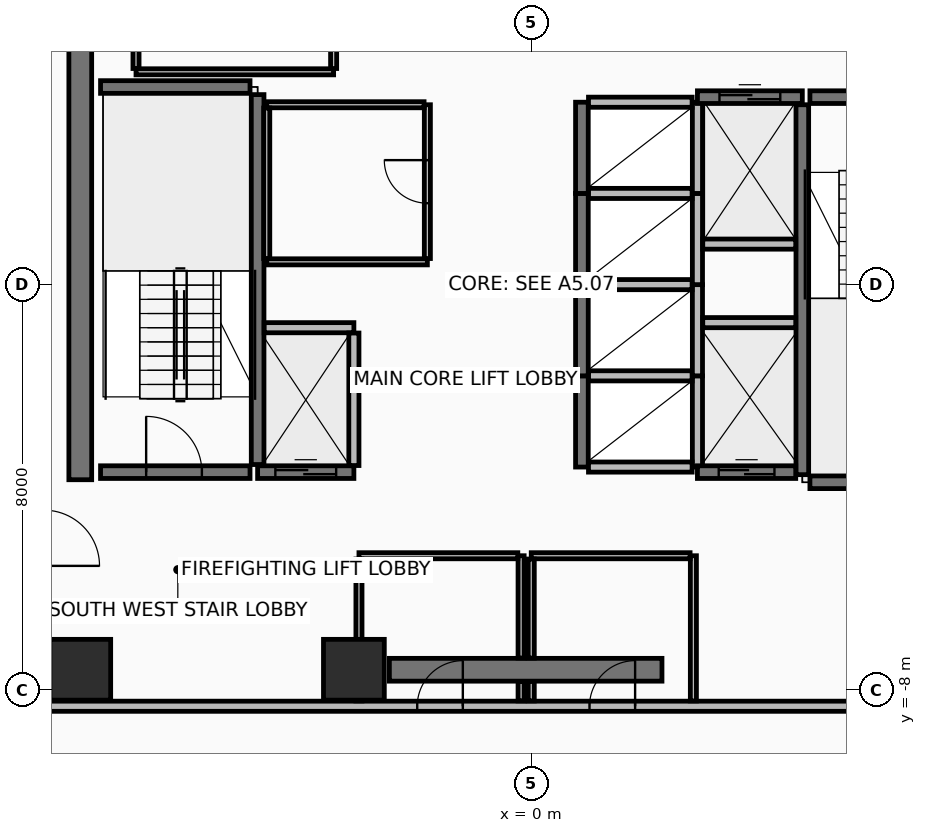
"""IFC4 building model, lengths in metres.
Left out: names, types, materials, properties, quantities, classifications, styles, units other than length and angle.
Written with IfcOpenShell. Run it as: python <this file> out.ifc"""

import sys

from ifc_helpers import new_model, si_unit, direction, frame, frame_2d, origin, origin_2d, place, context, subcontext, project, spatial, rectangle, extrude, element, fill, save


model = new_model("IFC4")
c1 = context("Model", 3, precision=1e-05, world=origin(), true_north=direction((0.0, 1.0)))
c2 = subcontext(c1, "Body", "Model", "MODEL_VIEW")
j1 = project(units=[si_unit("LENGTHUNIT", "METRE"), si_unit("PLANEANGLEUNIT", "RADIAN")], contexts=[c1])
p1 = place(None, origin())
s1 = spatial("IfcSite", under=j1, at=p1, CompositionType="ELEMENT")
p2 = place(p1, origin())
s2 = spatial("IfcBuilding", under=s1, at=p2, CompositionType="ELEMENT")
p3 = place(p2, frame((0.0, 0.0, 119.65)))
s3 = spatial("IfcBuildingStorey", under=s2, at=p3, CompositionType="ELEMENT", Elevation=119.65)
for number, where, z_axis, x_axis in (
    (1, (-8.9, -7.6, 0.0), (0.0, 0.0, 1.0), (1.0, 0.0, 0.0)),
    (2, (-3.5, -7.6, 0.0), (0.0, 0.0, 1.0), (1.0, 0.0, 0.0)),
):
    element("IfcColumn", number, at=place(p3, frame(where, z_axis=z_axis, x_axis=x_axis)), inside=s3, PredefinedType="COLUMN", context=c2, shape_type="SweptSolid", body=[
        extrude(rectangle(XDim=1.2, YDim=1.2, at=origin_2d()), origin(), (0.0, 0.0, 1.0), 3.6),
    ])
p4 = place(p3, frame((-2.8, -7.6, 0.0), z_axis=(0.0, 0.0, 1.0), x_axis=(1.0, 0.0, 0.0)))
e3 = element("IfcWall", 3, at=p4, inside=s3, PredefinedType="SHEAR", context=c2, shape_type="SweptSolid", body=[
    extrude(rectangle(XDim=5.38, YDim=0.45, at=frame_2d((2.69, 0.0))), origin(), (0.0, 0.0, 1.0), 3.41),
])
p5 = place(p3, frame((-8.9, -3.85, 0.0), z_axis=(0.0, 0.0, 1.0), x_axis=(0.0, 1.0, 0.0)))
e4 = element("IfcWall", 4, at=p5, inside=s3, PredefinedType="SHEAR", context=c2, shape_type="SweptSolid", body=[
    extrude(rectangle(XDim=10.7, YDim=0.45, at=frame_2d((5.35, 0.0))), origin(), (0.0, 0.0, 1.0), 3.41),
])
p6 = place(p3, frame((-9.62, -8.32, 0.0), z_axis=(0.0, 0.0, 1.0), x_axis=(1.0, 0.0, 0.0)))
e5 = element("IfcWall", 5, at=p6, inside=s3, PredefinedType="PARTITIONING", context=c2, shape_type="SweptSolid", body=[
    extrude(rectangle(XDim=19.24, YDim=0.2, at=frame_2d((9.62, 0.0))), origin(), (0.0, 0.0, 1.0), 2.855),
])
p7 = place(p6, frame((7.37, 0.0, 0.0)))
e6 = element("IfcOpeningElement", 6, at=p7, cuts=e5, PredefinedType="OPENING", context=c2, shape_type="SweptSolid", body=[
    extrude(rectangle(XDim=0.9, YDim=2.1, at=frame_2d((0.45, 1.05))), frame((0.0, 0.11, 0.0), z_axis=(0.0, -1.0, 0.0), x_axis=(1.0, 0.0, 0.0)), (0.0, 0.0, 1.0), 0.22),
])
p8 = place(p6, frame((10.77, 0.0, 0.0)))
e7 = element("IfcOpeningElement", 7, at=p8, cuts=e5, PredefinedType="OPENING", context=c2, shape_type="SweptSolid", body=[
    extrude(rectangle(XDim=0.9, YDim=2.1, at=frame_2d((0.45, 1.05))), frame((0.0, 0.11, 0.0), z_axis=(0.0, -1.0, 0.0), x_axis=(1.0, 0.0, 0.0)), (0.0, 0.0, 1.0), 0.22),
])
p9 = place(p3, frame((-5.4, -3.55, 0.0), z_axis=(0.0, 0.0, 1.0), x_axis=(0.0, 1.0, 0.0)))
e8 = element("IfcWall", 8, at=p9, inside=s3, PredefinedType="SHEAR", context=c2, shape_type="SweptSolid", body=[
    extrude(rectangle(XDim=7.3, YDim=0.25, at=frame_2d((3.65, 0.0))), origin(), (0.0, 0.0, 1.0), 3.41),
])
p10 = place(p3, frame((-8.5, -3.7, 0.0), z_axis=(0.0, 0.0, 1.0), x_axis=(1.0, 0.0, 0.0)))
e9 = element("IfcWall", 9, at=p10, inside=s3, PredefinedType="SHEAR", context=c2, shape_type="SweptSolid", body=[
    extrude(rectangle(XDim=2.95, YDim=0.25, at=frame_2d((1.475, 0.0))), origin(), (0.0, 0.0, 1.0), 3.41),
])
p11 = place(p10, frame((0.9, 0.0, 0.0)))
e10 = element("IfcOpeningElement", 10, at=p11, cuts=e9, PredefinedType="OPENING", context=c2, shape_type="SweptSolid", body=[
    extrude(rectangle(XDim=1.1, YDim=2.15, at=frame_2d((0.55, 1.075))), frame((0.0, 0.135, 0.0), z_axis=(0.0, -1.0, 0.0), x_axis=(1.0, 0.0, 0.0)), (0.0, 0.0, 1.0), 0.27),
])
p12 = place(p3, frame((-8.5, 3.9, 0.0), z_axis=(0.0, 0.0, 1.0), x_axis=(1.0, 0.0, 0.0)))
e11 = element("IfcWall", 11, at=p12, inside=s3, PredefinedType="SHEAR", context=c2, shape_type="SweptSolid", body=[
    extrude(rectangle(XDim=2.95, YDim=0.25, at=frame_2d((1.475, 0.0))), origin(), (0.0, 0.0, 1.0), 3.41),
])
p13 = place(p3, frame((5.35, -3.75, 0.0), z_axis=(0.0, 0.0, 1.0), x_axis=(0.0, 1.0, 0.0)))
e12 = element("IfcWall", 12, at=p13, inside=s3, PredefinedType="SHEAR", context=c2, shape_type="SweptSolid", body=[
    extrude(rectangle(XDim=7.3, YDim=0.25, at=frame_2d((3.65, 0.0))), origin(), (0.0, 0.0, 1.0), 3.41),
])
p14 = place(p3, frame((5.5, 3.7, 0.0), z_axis=(0.0, 0.0, 1.0), x_axis=(1.0, 0.0, 0.0)))
e13 = element("IfcWall", 13, at=p14, inside=s3, PredefinedType="SHEAR", context=c2, shape_type="SweptSolid", body=[
    extrude(rectangle(XDim=3.0, YDim=0.25, at=frame_2d((1.5, 0.0))), origin(), (0.0, 0.0, 1.0), 3.41),
])
p15 = place(p14, frame((0.95, 0.0, 0.0)))
e14 = element("IfcOpeningElement", 14, at=p15, cuts=e13, PredefinedType="OPENING", context=c2, shape_type="SweptSolid", body=[
    extrude(rectangle(XDim=1.1, YDim=2.15, at=frame_2d((0.55, 1.075))), frame((0.0, 0.135, 0.0), z_axis=(0.0, -1.0, 0.0), x_axis=(1.0, 0.0, 0.0)), (0.0, 0.0, 1.0), 0.27),
])
p16 = place(p3, frame((5.5, -3.9, 0.0), z_axis=(0.0, 0.0, 1.0), x_axis=(1.0, 0.0, 0.0)))
e15 = element("IfcWall", 15, at=p16, inside=s3, PredefinedType="SHEAR", context=c2, shape_type="SweptSolid", body=[
    extrude(rectangle(XDim=3.0, YDim=0.25, at=frame_2d((1.5, 0.0))), origin(), (0.0, 0.0, 1.0), 3.41),
])
p17 = place(p3, frame((1.0, -3.6, 0.0), z_axis=(0.0, 0.0, 1.0), x_axis=(0.0, 1.0, 0.0)))
e16 = element("IfcWall", 16, at=p17, inside=s3, PredefinedType="SHEAR", context=c2, shape_type="SweptSolid", body=[
    extrude(rectangle(XDim=1.8, YDim=0.25, at=frame_2d((0.9, 0.0))), origin(), (0.0, 0.0, 1.0), 3.41),
])
p18 = place(p3, frame((3.28, -3.6, 0.0), z_axis=(0.0, 0.0, 1.0), x_axis=(0.0, 1.0, 0.0)))
e17 = element("IfcWall", 17, at=p18, inside=s3, PredefinedType="PARTITIONING", context=c2, shape_type="SweptSolid", body=[
    extrude(rectangle(XDim=1.8, YDim=0.2, at=frame_2d((0.9, 0.0))), origin(), (0.0, 0.0, 1.0), 3.41),
])
for number, where, z_axis, x_axis in (
    (18, (1.13, -3.6, 0.0), (0.0, 0.0, 1.0), (1.0, 0.0, 0.0)),
    (19, (1.13, -1.8, 0.0), (0.0, 0.0, 1.0), (1.0, 0.0, 0.0)),
):
    element("IfcWall", number, at=place(p3, frame(where, z_axis=z_axis, x_axis=x_axis)), inside=s3, PredefinedType="PARTITIONING", context=c2, shape_type="SweptSolid", body=[
        extrude(rectangle(XDim=2.045, YDim=0.2, at=frame_2d((1.022, 0.0))), origin(), (0.0, 0.0, 1.0), 3.41),
    ])
p19 = place(p3, frame((1.0, -1.8, 0.0), z_axis=(0.0, 0.0, 1.0), x_axis=(0.0, 1.0, 0.0)))
e20 = element("IfcWall", 20, at=p19, inside=s3, PredefinedType="SHEAR", context=c2, shape_type="SweptSolid", body=[
    extrude(rectangle(XDim=1.8, YDim=0.25, at=frame_2d((0.9, 0.0))), origin(), (0.0, 0.0, 1.0), 3.41),
])
p20 = place(p3, frame((3.28, -1.8, 0.0), z_axis=(0.0, 0.0, 1.0), x_axis=(0.0, 1.0, 0.0)))
e21 = element("IfcWall", 21, at=p20, inside=s3, PredefinedType="PARTITIONING", context=c2, shape_type="SweptSolid", body=[
    extrude(rectangle(XDim=1.8, YDim=0.2, at=frame_2d((0.9, 0.0))), origin(), (0.0, 0.0, 1.0), 3.41),
])
p21 = place(p3, frame((1.13, 0.0, 0.0), z_axis=(0.0, 0.0, 1.0), x_axis=(1.0, 0.0, 0.0)))
e22 = element("IfcWall", 22, at=p21, inside=s3, PredefinedType="PARTITIONING", context=c2, shape_type="SweptSolid", body=[
    extrude(rectangle(XDim=2.045, YDim=0.2, at=frame_2d((1.022, 0.0))), origin(), (0.0, 0.0, 1.0), 3.41),
])
p22 = place(p3, frame((1.0, 0.0, 0.0), z_axis=(0.0, 0.0, 1.0), x_axis=(0.0, 1.0, 0.0)))
e23 = element("IfcWall", 23, at=p22, inside=s3, PredefinedType="SHEAR", context=c2, shape_type="SweptSolid", body=[
    extrude(rectangle(XDim=1.8, YDim=0.25, at=frame_2d((0.9, 0.0))), origin(), (0.0, 0.0, 1.0), 3.41),
])
p23 = place(p3, frame((3.28, 0.0, 0.0), z_axis=(0.0, 0.0, 1.0), x_axis=(0.0, 1.0, 0.0)))
e24 = element("IfcWall", 24, at=p23, inside=s3, PredefinedType="PARTITIONING", context=c2, shape_type="SweptSolid", body=[
    extrude(rectangle(XDim=1.8, YDim=0.2, at=frame_2d((0.9, 0.0))), origin(), (0.0, 0.0, 1.0), 3.41),
])
p24 = place(p3, frame((1.13, 1.8, 0.0), z_axis=(0.0, 0.0, 1.0), x_axis=(1.0, 0.0, 0.0)))
e25 = element("IfcWall", 25, at=p24, inside=s3, PredefinedType="PARTITIONING", context=c2, shape_type="SweptSolid", body=[
    extrude(rectangle(XDim=2.045, YDim=0.2, at=frame_2d((1.022, 0.0))), origin(), (0.0, 0.0, 1.0), 3.41),
])
p25 = place(p3, frame((1.0, 1.8, 0.0), z_axis=(0.0, 0.0, 1.0), x_axis=(0.0, 1.0, 0.0)))
e26 = element("IfcWall", 26, at=p25, inside=s3, PredefinedType="SHEAR", context=c2, shape_type="SweptSolid", body=[
    extrude(rectangle(XDim=1.8, YDim=0.25, at=frame_2d((0.9, 0.0))), origin(), (0.0, 0.0, 1.0), 3.41),
])
p26 = place(p3, frame((3.28, 1.8, 0.0), z_axis=(0.0, 0.0, 1.0), x_axis=(0.0, 1.0, 0.0)))
e27 = element("IfcWall", 27, at=p26, inside=s3, PredefinedType="PARTITIONING", context=c2, shape_type="SweptSolid", body=[
    extrude(rectangle(XDim=1.8, YDim=0.2, at=frame_2d((0.9, 0.0))), origin(), (0.0, 0.0, 1.0), 3.41),
])
p27 = place(p3, frame((1.13, 3.6, 0.0), z_axis=(0.0, 0.0, 1.0), x_axis=(1.0, 0.0, 0.0)))
e28 = element("IfcWall", 28, at=p27, inside=s3, PredefinedType="PARTITIONING", context=c2, shape_type="SweptSolid", body=[
    extrude(rectangle(XDim=2.045, YDim=0.2, at=frame_2d((1.022, 0.0))), origin(), (0.0, 0.0, 1.0), 2.605),
])
p28 = place(p3, frame((-5.4, -3.7, 0.0), z_axis=(0.0, 0.0, 1.0), x_axis=(1.0, 0.0, 0.0)))
e29 = element("IfcWall", 29, at=p28, inside=s3, PredefinedType="SHEAR", context=c2, shape_type="SweptSolid", body=[
    extrude(rectangle(XDim=1.9, YDim=0.25, at=frame_2d((0.95, 0.0))), origin(), (0.0, 0.0, 1.0), 3.41),
])
p29 = place(p28, frame((0.35, 0.0, 0.0)))
e30 = element("IfcOpeningElement", 30, at=p29, cuts=e29, PredefinedType="OPENING", context=c2, shape_type="SweptSolid", body=[
    extrude(rectangle(XDim=1.2, YDim=2.2, at=frame_2d((0.6, 1.1))), frame((0.0, 0.135, 0.0), z_axis=(0.0, -1.0, 0.0), x_axis=(1.0, 0.0, 0.0)), (0.0, 0.0, 1.0), 0.27),
])
p30 = place(p3, frame((-5.27, -0.85, 0.0), z_axis=(0.0, 0.0, 1.0), x_axis=(1.0, 0.0, 0.0)))
e31 = element("IfcWall", 31, at=p30, inside=s3, PredefinedType="PARTITIONING", context=c2, shape_type="SweptSolid", body=[
    extrude(rectangle(XDim=1.77, YDim=0.2, at=frame_2d((0.885, 0.0))), origin(), (0.0, 0.0, 1.0), 3.41),
])
p31 = place(p3, frame((-3.5, -3.57, 0.0), z_axis=(0.0, 0.0, 1.0), x_axis=(0.0, 1.0, 0.0)))
e32 = element("IfcWall", 32, at=p31, inside=s3, PredefinedType="PARTITIONING", context=c2, shape_type="SweptSolid", body=[
    extrude(rectangle(XDim=2.615, YDim=0.2, at=frame_2d((1.308, 0.0))), origin(), (0.0, 0.0, 1.0), 3.41),
])
p32 = place(p3, frame((3.28, 3.7, 0.0), z_axis=(0.0, 0.0, 1.0), x_axis=(1.0, 0.0, 0.0)))
e33 = element("IfcWall", 33, at=p32, inside=s3, PredefinedType="SHEAR", context=c2, shape_type="SweptSolid", body=[
    extrude(rectangle(XDim=2.07, YDim=0.25, at=frame_2d((1.035, 0.0))), origin(), (0.0, 0.0, 1.0), 3.41),
])
p33 = place(p32, frame((0.435, 0.0, 0.0)))
e34 = element("IfcOpeningElement", 34, at=p33, cuts=e33, PredefinedType="OPENING", context=c2, shape_type="SweptSolid", body=[
    extrude(rectangle(XDim=1.2, YDim=2.2, at=frame_2d((0.6, 1.1))), frame((0.0, 0.135, 0.0), z_axis=(0.0, -1.0, 0.0), x_axis=(1.0, 0.0, 0.0)), (0.0, 0.0, 1.0), 0.27),
])
p34 = place(p3, frame((3.385, 0.8, 0.0), z_axis=(0.0, 0.0, 1.0), x_axis=(1.0, 0.0, 0.0)))
e35 = element("IfcWall", 35, at=p34, inside=s3, PredefinedType="PARTITIONING", context=c2, shape_type="SweptSolid", body=[
    extrude(rectangle(XDim=1.835, YDim=0.2, at=frame_2d((0.917, 0.0))), origin(), (0.0, 0.0, 1.0), 3.41),
])
p35 = place(p3, frame((3.28, -3.7, 0.0), z_axis=(0.0, 0.0, 1.0), x_axis=(1.0, 0.0, 0.0)))
e36 = element("IfcWall", 36, at=p35, inside=s3, PredefinedType="SHEAR", context=c2, shape_type="SweptSolid", body=[
    extrude(rectangle(XDim=1.94, YDim=0.25, at=frame_2d((0.97, 0.0))), origin(), (0.0, 0.0, 1.0), 3.41),
])
p36 = place(p35, frame((0.42, 0.0, 0.0)))
e37 = element("IfcOpeningElement", 37, at=p36, cuts=e36, PredefinedType="OPENING", context=c2, shape_type="SweptSolid", body=[
    extrude(rectangle(XDim=1.1, YDim=2.2, at=frame_2d((0.55, 1.1))), frame((0.0, 0.135, 0.0), z_axis=(0.0, -1.0, 0.0), x_axis=(1.0, 0.0, 0.0)), (0.0, 0.0, 1.0), 0.27),
])
p37 = place(p3, frame((3.385, -0.75, 0.0), z_axis=(0.0, 0.0, 1.0), x_axis=(1.0, 0.0, 0.0)))
e38 = element("IfcWall", 38, at=p37, inside=s3, PredefinedType="PARTITIONING", context=c2, shape_type="SweptSolid", body=[
    extrude(rectangle(XDim=1.835, YDim=0.2, at=frame_2d((0.917, 0.0))), origin(), (0.0, 0.0, 1.0), 3.41),
])
p38 = place(p3, frame((-5.22, 0.45, 0.0), z_axis=(0.0, 0.0, 1.0), x_axis=(1.0, 0.0, 0.0)))
e39 = element("IfcWall", 39, at=p38, inside=s3, PredefinedType="PARTITIONING", context=c2, shape_type="SweptSolid", body=[
    extrude(rectangle(XDim=3.17, YDim=0.12, at=frame_2d((1.585, 0.0))), origin(), (0.0, 0.0, 1.0), 3.41),
])
p39 = place(p3, frame((-2.05, 0.515, 0.0), z_axis=(0.0, 0.0, 1.0), x_axis=(0.0, 1.0, 0.0)))
e40 = element("IfcWall", 40, at=p39, inside=s3, PredefinedType="PARTITIONING", context=c2, shape_type="SweptSolid", body=[
    extrude(rectangle(XDim=3.035, YDim=0.12, at=frame_2d((1.518, 0.0))), origin(), (0.0, 0.0, 1.0), 3.41),
])
p40 = place(p39, frame((1.092, 0.0, 0.0)))
e41 = element("IfcOpeningElement", 41, at=p40, cuts=e40, PredefinedType="OPENING", context=c2, shape_type="SweptSolid", body=[
    extrude(rectangle(XDim=0.85, YDim=2.1, at=frame_2d((0.425, 1.05))), frame((0.0, 0.07, 0.0), z_axis=(0.0, -1.0, 0.0), x_axis=(1.0, 0.0, 0.0)), (0.0, 0.0, 1.0), 0.14),
])
p41 = place(p3, frame((-2.115, 3.55, 0.0), z_axis=(0.0, 0.0, 1.0), x_axis=(-1.0, 0.0, 0.0)))
e42 = element("IfcWall", 42, at=p41, inside=s3, PredefinedType="PARTITIONING", context=c2, shape_type="SweptSolid", body=[
    extrude(rectangle(XDim=3.105, YDim=0.12, at=frame_2d((1.552, 0.0))), origin(), (0.0, 0.0, 1.0), 3.41),
])
p42 = place(p3, frame((-5.22, 3.485, 0.0), z_axis=(0.0, 0.0, 1.0), x_axis=(0.0, -1.0, 0.0)))
e43 = element("IfcWall", 43, at=p42, inside=s3, PredefinedType="PARTITIONING", context=c2, shape_type="SweptSolid", body=[
    extrude(rectangle(XDim=2.97, YDim=0.12, at=frame_2d((1.485, 0.0))), origin(), (0.0, 0.0, 1.0), 3.41),
])
p43 = place(p3, frame((-0.2, -8.215, 0.0), z_axis=(0.0, 0.0, 1.0), x_axis=(0.0, 1.0, 0.0)))
e44 = element("IfcWall", 44, at=p43, inside=s3, PredefinedType="PARTITIONING", context=c2, shape_type="SweptSolid", body=[
    extrude(rectangle(XDim=0.385, YDim=0.12, at=frame_2d((0.192, 0.0))), origin(), (0.0, 0.0, 1.0), 2.605),
])
p44 = place(p3, frame((-0.2, -7.37, 0.0), z_axis=(0.0, 0.0, 1.0), x_axis=(0.0, 1.0, 0.0)))
e45 = element("IfcWall", 45, at=p44, inside=s3, PredefinedType="PARTITIONING", context=c2, shape_type="SweptSolid", body=[
    extrude(rectangle(XDim=2.02, YDim=0.12, at=frame_2d((1.01, 0.0))), origin(), (0.0, 0.0, 1.0), 2.605),
])
p45 = place(p3, frame((-0.265, -5.35, 0.0), z_axis=(0.0, 0.0, 1.0), x_axis=(-1.0, 0.0, 0.0)))
e46 = element("IfcWall", 46, at=p45, inside=s3, PredefinedType="PARTITIONING", context=c2, shape_type="SweptSolid", body=[
    extrude(rectangle(XDim=3.135, YDim=0.12, at=frame_2d((1.567, 0.0))), origin(), (0.0, 0.0, 1.0), 2.605),
])
p46 = place(p3, frame((-3.4, -5.415, 0.0), z_axis=(0.0, 0.0, 1.0), x_axis=(0.0, -1.0, 0.0)))
e47 = element("IfcWall", 47, at=p46, inside=s3, PredefinedType="PARTITIONING", context=c2, shape_type="SweptSolid", body=[
    extrude(rectangle(XDim=2.8, YDim=0.12, at=frame_2d((1.4, 0.0))), origin(), (0.0, 0.0, 1.0), 2.605),
])
p47 = place(p3, frame((3.2, -8.215, 0.0), z_axis=(0.0, 0.0, 1.0), x_axis=(0.0, 1.0, 0.0)))
e48 = element("IfcWall", 48, at=p47, inside=s3, PredefinedType="PARTITIONING", context=c2, shape_type="SweptSolid", body=[
    extrude(rectangle(XDim=2.865, YDim=0.12, at=frame_2d((1.433, 0.0))), origin(), (0.0, 0.0, 1.0), 2.605),
])
p48 = place(p3, frame((3.135, -5.35, 0.0), z_axis=(0.0, 0.0, 1.0), x_axis=(-1.0, 0.0, 0.0)))
e49 = element("IfcWall", 49, at=p48, inside=s3, PredefinedType="PARTITIONING", context=c2, shape_type="SweptSolid", body=[
    extrude(rectangle(XDim=3.135, YDim=0.12, at=frame_2d((1.567, 0.0))), origin(), (0.0, 0.0, 1.0), 3.41),
])
p49 = place(p3, frame((0.0, -5.415, 0.0), z_axis=(0.0, 0.0, 1.0), x_axis=(0.0, -1.0, 0.0)))
e50 = element("IfcWall", 50, at=p49, inside=s3, PredefinedType="PARTITIONING", context=c2, shape_type="SweptSolid", body=[
    extrude(rectangle(XDim=1.955, YDim=0.12, at=frame_2d((0.978, 0.0))), origin(), (0.0, 0.0, 1.0), 2.605),
])
p50 = place(p3, frame((0.0, -7.83, 0.0), z_axis=(0.0, 0.0, 1.0), x_axis=(0.0, -1.0, 0.0)))
e51 = element("IfcWall", 51, at=p50, inside=s3, PredefinedType="PARTITIONING", context=c2, shape_type="SweptSolid", body=[
    extrude(rectangle(XDim=0.385, YDim=0.12, at=frame_2d((0.192, 0.0))), origin(), (0.0, 0.0, 1.0), 2.605),
])
p51 = place(p3, frame((-7.8, 4.2, 0.0), z_axis=(0.0, 0.0, 1.0), x_axis=(1.0, 0.0, 0.0)))
e52 = element("IfcWall", 52, at=p51, inside=s3, PredefinedType="PARTITIONING", context=c2, shape_type="SweptSolid", body=[
    extrude(rectangle(XDim=3.9, YDim=0.12, at=frame_2d((1.95, 0.0))), origin(), (0.0, 0.0, 1.0), 3.41),
])
for number, where, z_axis, x_axis in (
    (53, (-3.9, 4.265, 0.0), (0.0, 0.0, 1.0), (0.0, 1.0, 0.0)),
    (54, (-7.8, 8.215, 0.0), (0.0, 0.0, 1.0), (0.0, -1.0, 0.0)),
):
    element("IfcWall", number, at=place(p3, frame(where, z_axis=z_axis, x_axis=x_axis)), inside=s3, PredefinedType="PARTITIONING", context=c2, shape_type="SweptSolid", body=[
        extrude(rectangle(XDim=3.95, YDim=0.12, at=frame_2d((1.975, 0.0))), origin(), (0.0, 0.0, 1.0), 2.605),
    ])
p52 = place(p11, origin())
e55 = element("IfcDoor", 55, at=p52, inside=s3, OperationType="SINGLE_SWING_LEFT", PredefinedType="DOOR", context=c2, shape_type="SweptSolid", body=[
    extrude(rectangle(XDim=1.1, YDim=2.15, at=frame_2d((0.55, 1.075))), frame((0.0, 0.025, 0.0), z_axis=(0.0, -1.0, 0.0), x_axis=(1.0, 0.0, 0.0)), (0.0, 0.0, 1.0), 0.05),
])
fill(e10, e55)
p53 = place(p29, origin())
e56 = element("IfcDoor", 56, at=p53, inside=s3, OperationType="SLIDING_TO_RIGHT", PredefinedType="DOOR", context=c2, shape_type="SweptSolid", body=[
    extrude(rectangle(XDim=1.2, YDim=2.2, at=frame_2d((0.6, 1.1))), frame((0.0, 0.025, 0.0), z_axis=(0.0, -1.0, 0.0), x_axis=(1.0, 0.0, 0.0)), (0.0, 0.0, 1.0), 0.05),
])
fill(e30, e56)
p54 = place(p33, origin())
e57 = element("IfcDoor", 57, at=p54, inside=s3, OperationType="SLIDING_TO_RIGHT", PredefinedType="DOOR", context=c2, shape_type="SweptSolid", body=[
    extrude(rectangle(XDim=1.2, YDim=2.2, at=frame_2d((0.6, 1.1))), frame((0.0, 0.025, 0.0), z_axis=(0.0, -1.0, 0.0), x_axis=(1.0, 0.0, 0.0)), (0.0, 0.0, 1.0), 0.05),
])
fill(e34, e57)
p55 = place(p36, origin())
e58 = element("IfcDoor", 58, at=p55, inside=s3, OperationType="SLIDING_TO_LEFT", PredefinedType="DOOR", context=c2, shape_type="SweptSolid", body=[
    extrude(rectangle(XDim=1.1, YDim=2.2, at=frame_2d((0.55, 1.1))), frame((0.0, 0.025, 0.0), z_axis=(0.0, -1.0, 0.0), x_axis=(1.0, 0.0, 0.0)), (0.0, 0.0, 1.0), 0.05),
])
fill(e37, e58)
p56 = place(p40, frame((0.85, 0.0, 0.0), z_axis=(0.0, 0.0, 1.0), x_axis=(-1.0, 0.0, 0.0)))
e59 = element("IfcDoor", 59, at=p56, inside=s3, OperationType="SINGLE_SWING_RIGHT", PredefinedType="DOOR", context=c2, shape_type="SweptSolid", body=[
    extrude(rectangle(XDim=0.85, YDim=2.1, at=frame_2d((0.425, 1.05))), frame((0.0, 0.025, 0.0), z_axis=(0.0, -1.0, 0.0), x_axis=(1.0, 0.0, 0.0)), (0.0, 0.0, 1.0), 0.05),
])
fill(e41, e59)
p57 = place(p7, frame((0.9, 0.0, 0.0), z_axis=(0.0, 0.0, 1.0), x_axis=(-1.0, 0.0, 0.0)))
e60 = element("IfcDoor", 60, at=p57, inside=s3, OperationType="SINGLE_SWING_LEFT", PredefinedType="DOOR", context=c2, shape_type="SweptSolid", body=[
    extrude(rectangle(XDim=0.9, YDim=2.1, at=frame_2d((0.45, 1.05))), frame((0.0, 0.025, 0.0), z_axis=(0.0, -1.0, 0.0), x_axis=(1.0, 0.0, 0.0)), (0.0, 0.0, 1.0), 0.05),
])
fill(e6, e60)
p58 = place(p8, frame((0.9, 0.0, 0.0), z_axis=(0.0, 0.0, 1.0), x_axis=(-1.0, 0.0, 0.0)))
e61 = element("IfcDoor", 61, at=p58, inside=s3, OperationType="SINGLE_SWING_LEFT", PredefinedType="DOOR", context=c2, shape_type="SweptSolid", body=[
    extrude(rectangle(XDim=0.9, YDim=2.1, at=frame_2d((0.45, 1.05))), frame((0.0, 0.025, 0.0), z_axis=(0.0, -1.0, 0.0), x_axis=(1.0, 0.0, 0.0)), (0.0, 0.0, 1.0), 0.05),
])
fill(e7, e61)
save(model, sys.argv[1])
